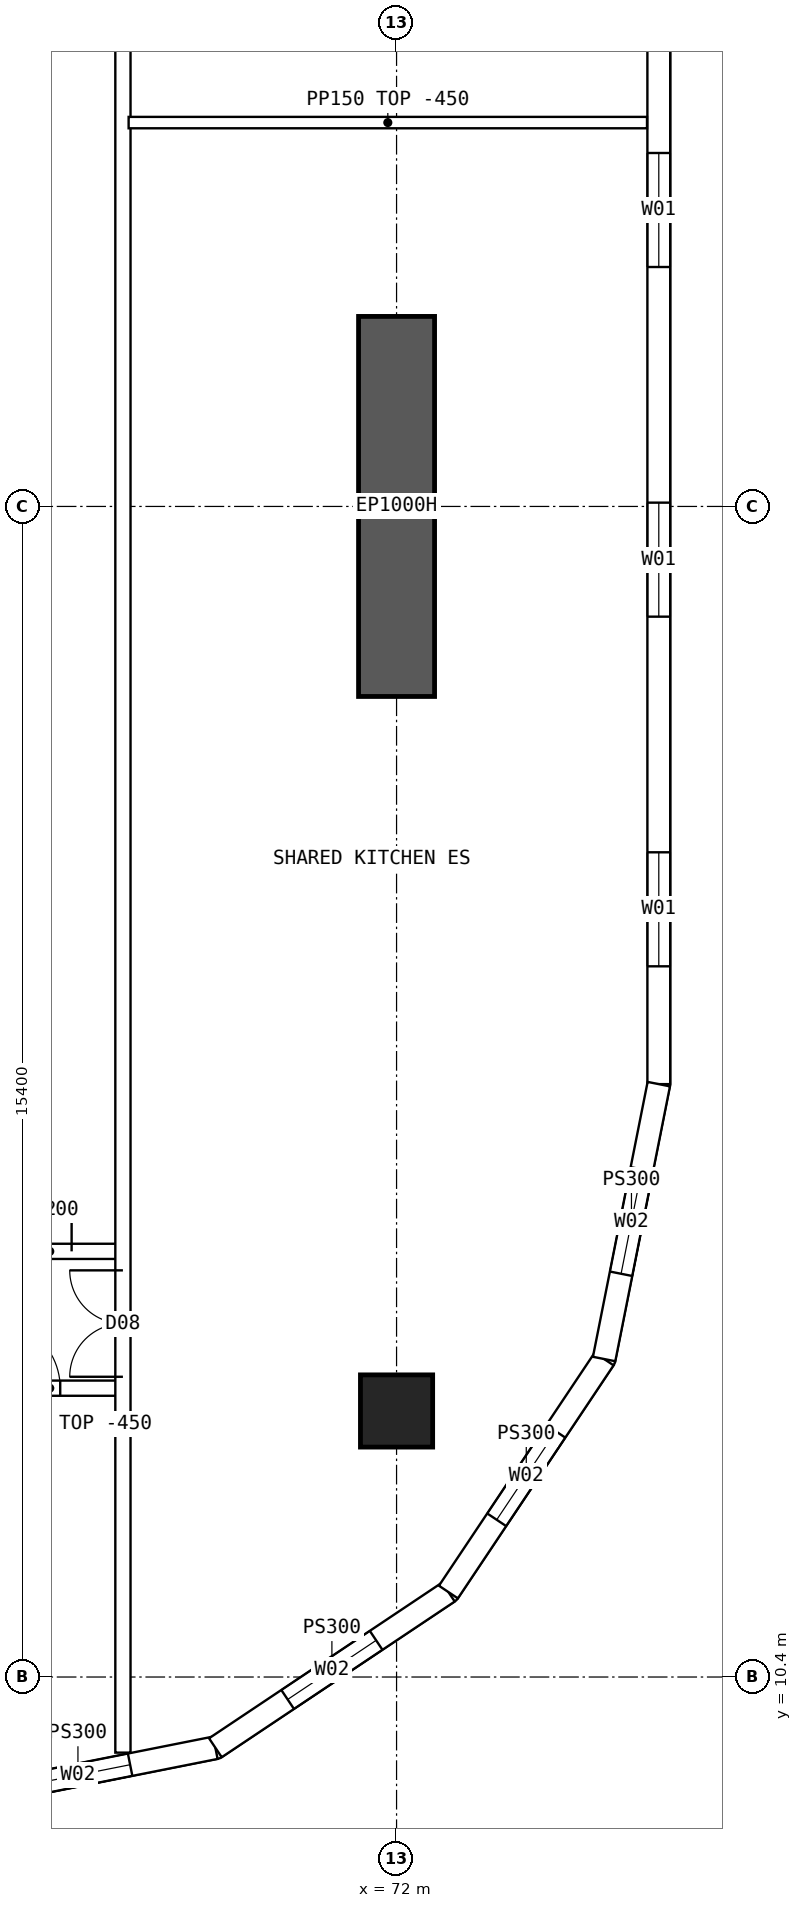
"""IFC4 building model, lengths in metres.
Left out: names, types, materials, properties, quantities, classifications, styles, units other than length and angle.
Written with IfcOpenShell. Run it as: python <this file> out.ifc"""

import sys

from ifc_helpers import new_model, si_unit, direction, frame, frame_2d, origin, origin_2d, place, context, subcontext, project, spatial, polyline, rectangle, hollow_rectangle, outline, extrude, element, fill, save


model = new_model("IFC4")
c1 = context("Model", 3, precision=1e-05, world=origin(), true_north=direction((0.0, 1.0)))
c2 = subcontext(c1, "Body", "Model", "MODEL_VIEW")
j1 = project(units=[si_unit("LENGTHUNIT", "METRE"), si_unit("PLANEANGLEUNIT", "RADIAN")], contexts=[c1])
p1 = place(None, origin())
s1 = spatial("IfcSite", under=j1, at=p1, CompositionType="ELEMENT")
p2 = place(p1, origin())
s2 = spatial("IfcBuilding", under=s1, at=p2, CompositionType="ELEMENT")
p3 = place(p2, frame((0.0, 0.0, 110.65)))
s3 = spatial("IfcBuildingStorey", under=s2, at=p3, CompositionType="ELEMENT", Elevation=110.65)
p4 = place(p3, frame((72.0, 13.9, 0.0), z_axis=(0.0, 0.0, 1.0), x_axis=(1.0, 0.0, 0.0)))
e1 = element("IfcColumn", 1, at=p4, inside=s3, PredefinedType="COLUMN", context=c2, shape_type="SweptSolid", body=[
    extrude(hollow_rectangle(XDim=0.95, YDim=0.95, WallThickness=0.095, at=origin_2d()), origin(), (0.0, 0.0, 1.0), 3.75),
])
p5 = place(p3, frame((72.0, 23.3, 0.0), z_axis=(0.0, 0.0, 1.0), x_axis=(0.0, 1.0, 0.0)))
e2 = element("IfcWall", 2, at=p5, inside=s3, PredefinedType="SHEAR", context=c2, shape_type="SweptSolid", body=[
    extrude(rectangle(XDim=5.0, YDim=1.0, at=frame_2d((2.5, 0.0))), origin(), (0.0, 0.0, 1.0), 3.75),
])
p6 = place(p3, frame((75.45, 18.2, 0.0), z_axis=(0.0, 0.0, 1.0), x_axis=(0.0, 1.0, 0.0)))
e3 = element("IfcWall", 3, at=p6, inside=s3, PredefinedType="SOLIDWALL", context=c2, shape_type="SweptSolid", body=[
    extrude(outline(polyline([(-0.015, -0.15), (27.615, -0.15), (27.585, 0.15), (0.015, 0.15), (-0.015, -0.15)])), origin(), (0.0, 0.0, 1.0), 3.3),
])
p7 = place(p6, frame((1.55, 0.0, 0.9)))
e4 = element("IfcOpeningElement", 4, at=p7, cuts=e3, PredefinedType="OPENING", context=c2, shape_type="SweptSolid", body=[
    extrude(rectangle(XDim=1.5, YDim=2.0, at=frame_2d((0.75, 1.0))), frame((0.0, 0.16, 0.0), z_axis=(0.0, -1.0, 0.0), x_axis=(1.0, 0.0, 0.0)), (0.0, 0.0, 1.0), 0.32),
])
p8 = place(p6, frame((6.15, 0.0, 0.9)))
e5 = element("IfcOpeningElement", 5, at=p8, cuts=e3, PredefinedType="OPENING", context=c2, shape_type="SweptSolid", body=[
    extrude(rectangle(XDim=1.5, YDim=2.0, at=frame_2d((0.75, 1.0))), frame((0.0, 0.16, 0.0), z_axis=(0.0, -1.0, 0.0), x_axis=(1.0, 0.0, 0.0)), (0.0, 0.0, 1.0), 0.32),
])
p9 = place(p6, frame((10.75, 0.0, 0.9)))
e6 = element("IfcOpeningElement", 6, at=p9, cuts=e3, PredefinedType="OPENING", context=c2, shape_type="SweptSolid", body=[
    extrude(rectangle(XDim=1.5, YDim=2.0, at=frame_2d((0.75, 1.0))), frame((0.0, 0.16, 0.0), z_axis=(0.0, -1.0, 0.0), x_axis=(1.0, 0.0, 0.0)), (0.0, 0.0, 1.0), 0.32),
])
p10 = place(p6, frame((15.35, 0.0, 0.9)))
e7 = element("IfcOpeningElement", 7, at=p10, cuts=e3, PredefinedType="OPENING", context=c2, shape_type="SweptSolid", body=[
    extrude(rectangle(XDim=1.5, YDim=2.0, at=frame_2d((0.75, 1.0))), frame((0.0, 0.16, 0.0), z_axis=(0.0, -1.0, 0.0), x_axis=(1.0, 0.0, 0.0)), (0.0, 0.0, 1.0), 0.32),
])
p11 = place(p6, frame((19.95, 0.0, 0.9)))
e8 = element("IfcOpeningElement", 8, at=p11, cuts=e3, PredefinedType="OPENING", context=c2, shape_type="SweptSolid", body=[
    extrude(rectangle(XDim=1.5, YDim=2.0, at=frame_2d((0.75, 1.0))), frame((0.0, 0.16, 0.0), z_axis=(0.0, -1.0, 0.0), x_axis=(1.0, 0.0, 0.0)), (0.0, 0.0, 1.0), 0.32),
])
p12 = place(p6, frame((24.55, 0.0, 0.9)))
e9 = element("IfcOpeningElement", 9, at=p12, cuts=e3, PredefinedType="OPENING", context=c2, shape_type="SweptSolid", body=[
    extrude(rectangle(XDim=1.5, YDim=2.0, at=frame_2d((0.75, 1.0))), frame((0.0, 0.16, 0.0), z_axis=(0.0, -1.0, 0.0), x_axis=(1.0, 0.0, 0.0)), (0.0, 0.0, 1.0), 0.32),
])
p13 = place(p3, frame((66.0, 8.75, 0.0), z_axis=(0.0, 0.0, 1.0), x_axis=(0.980791473772, 0.195059183267, 0.0)))
e10 = element("IfcWall", 10, at=p13, inside=s3, PredefinedType="SOLIDWALL", context=c2, shape_type="SweptSolid", body=[
    extrude(outline(polyline([(-0.03, -0.15), (3.717, -0.15), (3.657, 0.15), (0.03, 0.15), (-0.03, -0.15)])), origin(), (0.0, 0.0, 1.0), 3.3),
])
p14 = place(p13, frame((1.144, 0.0, 0.9)))
e11 = element("IfcOpeningElement", 11, at=p14, cuts=e10, PredefinedType="OPENING", context=c2, shape_type="SweptSolid", body=[
    extrude(rectangle(XDim=1.4, YDim=1.8, at=frame_2d((0.7, 0.9))), frame((0.0, 0.16, 0.0), z_axis=(0.0, -1.0, 0.0), x_axis=(1.0, 0.0, 0.0)), (0.0, 0.0, 1.0), 0.32),
])
p15 = place(p3, frame((69.616, 9.469, 0.0), z_axis=(0.0, 0.0, 1.0), x_axis=(0.831448786846, 0.555601399253, 0.0)))
e12 = element("IfcWall", 12, at=p15, inside=s3, PredefinedType="SOLIDWALL", context=c2, shape_type="SweptSolid", body=[
    extrude(outline(polyline([(-0.03, -0.15), (3.717, -0.15), (3.657, 0.15), (0.03, 0.15), (-0.03, -0.15)])), origin(), (0.0, 0.0, 1.0), 3.3),
])
p16 = place(p15, frame((1.144, 0.0, 0.9)))
e13 = element("IfcOpeningElement", 13, at=p16, cuts=e12, PredefinedType="OPENING", context=c2, shape_type="SweptSolid", body=[
    extrude(rectangle(XDim=1.4, YDim=1.8, at=frame_2d((0.7, 0.9))), frame((0.0, 0.16, 0.0), z_axis=(0.0, -1.0, 0.0), x_axis=(1.0, 0.0, 0.0)), (0.0, 0.0, 1.0), 0.32),
])
p17 = place(p3, frame((72.682, 11.518, 0.0), z_axis=(0.0, 0.0, 1.0), x_axis=(0.555601399253, 0.831448786846, 0.0)))
e14 = element("IfcWall", 14, at=p17, inside=s3, PredefinedType="SOLIDWALL", context=c2, shape_type="SweptSolid", body=[
    extrude(outline(polyline([(-0.03, -0.15), (3.717, -0.15), (3.657, 0.15), (0.03, 0.15), (-0.03, -0.15)])), origin(), (0.0, 0.0, 1.0), 3.3),
])
p18 = place(p17, frame((1.144, 0.0, 0.9)))
e15 = element("IfcOpeningElement", 15, at=p18, cuts=e14, PredefinedType="OPENING", context=c2, shape_type="SweptSolid", body=[
    extrude(rectangle(XDim=1.4, YDim=1.8, at=frame_2d((0.7, 0.9))), frame((0.0, 0.16, 0.0), z_axis=(0.0, -1.0, 0.0), x_axis=(1.0, 0.0, 0.0)), (0.0, 0.0, 1.0), 0.32),
])
p19 = place(p3, frame((74.731, 14.583, 0.0), z_axis=(0.0, 0.0, 1.0), x_axis=(0.195059183267, 0.980791473772, 0.0)))
e16 = element("IfcWall", 16, at=p19, inside=s3, PredefinedType="SOLIDWALL", context=c2, shape_type="SweptSolid", body=[
    extrude(outline(polyline([(-0.03, -0.15), (3.702, -0.15), (3.672, 0.15), (0.03, 0.15), (-0.03, -0.15)])), origin(), (0.0, 0.0, 1.0), 3.3),
])
p20 = place(p19, frame((1.144, 0.0, 0.9)))
e17 = element("IfcOpeningElement", 17, at=p20, cuts=e16, PredefinedType="OPENING", context=c2, shape_type="SweptSolid", body=[
    extrude(rectangle(XDim=1.4, YDim=1.8, at=frame_2d((0.7, 0.9))), frame((0.0, 0.16, 0.0), z_axis=(0.0, -1.0, 0.0), x_axis=(1.0, 0.0, 0.0)), (0.0, 0.0, 1.0), 0.32),
])
p21 = place(p3, frame((66.475, 14.2, 0.0), z_axis=(0.0, 0.0, 1.0), x_axis=(1.0, 0.0, 0.0)))
e18 = element("IfcWall", 18, at=p21, inside=s3, PredefinedType="SOLIDWALL", context=c2, shape_type="SweptSolid", body=[
    extrude(rectangle(XDim=1.925, YDim=0.2, at=frame_2d((0.962, 0.0))), origin(), (0.0, 0.0, 1.0), 3.3),
])
p22 = place(p21, frame((0.2, 0.0, 0.0)))
e19 = element("IfcOpeningElement", 19, at=p22, cuts=e18, PredefinedType="OPENING", context=c2, shape_type="SweptSolid", body=[
    extrude(rectangle(XDim=0.9, YDim=2.1, at=frame_2d((0.45, 1.05))), frame((0.0, 0.11, 0.0), z_axis=(0.0, -1.0, 0.0), x_axis=(1.0, 0.0, 0.0)), (0.0, 0.0, 1.0), 0.22),
])
p23 = place(p3, frame((66.475, 16.0, 0.0), z_axis=(0.0, 0.0, 1.0), x_axis=(1.0, 0.0, 0.0)))
e20 = element("IfcWall", 20, at=p23, inside=s3, PredefinedType="SOLIDWALL", context=c2, shape_type="SweptSolid", body=[
    extrude(rectangle(XDim=1.925, YDim=0.2, at=frame_2d((0.962, 0.0))), origin(), (0.0, 0.0, 1.0), 3.3),
])
p24 = place(p23, frame((0.05, 0.0, 0.0)))
e21 = element("IfcOpeningElement", 21, at=p24, cuts=e20, PredefinedType="OPENING", context=c2, shape_type="SweptSolid", body=[
    extrude(rectangle(XDim=1.2, YDim=2.1, at=frame_2d((0.6, 1.05))), frame((0.0, 0.11, 0.0), z_axis=(0.0, -1.0, 0.0), x_axis=(1.0, 0.0, 0.0)), (0.0, 0.0, 1.0), 0.22),
])
p25 = place(p3, frame((68.475, 30.85, 0.0), z_axis=(0.0, 0.0, 1.0), x_axis=(1.0, 0.0, 0.0)))
e22 = element("IfcWall", 22, at=p25, inside=s3, PredefinedType="PARTITIONING", context=c2, shape_type="SweptSolid", body=[
    extrude(outline(polyline([(0.0, 0.0), (6.82, 0.0), (6.82, 3.3), (3.827, 3.3), (3.825, 2.85), (3.227, 2.85), (3.225, 3.3), (0.0, 3.3), (0.0, 0.0)])), frame((0.0, 0.075, 0.0), z_axis=(0.0, -1.0, 0.0), x_axis=(1.0, 0.0, 0.0)), (0.0, 0.0, 1.0), 0.15),
])
p26 = place(p3, frame((68.4, 9.405, 0.0), z_axis=(0.0, 0.0, 1.0), x_axis=(0.0, 1.0, 0.0)))
e23 = element("IfcWall", 23, at=p26, inside=s3, PredefinedType="SOLIDWALL", context=c2, shape_type="SweptSolid", body=[
    extrude(rectangle(XDim=45.189, YDim=0.2, at=frame_2d((22.595, 0.0))), origin(), (0.0, 0.0, 1.0), 3.3),
])
p27 = place(p26, frame((25.595, 0.0, 0.0)))
e24 = element("IfcOpeningElement", 24, at=p27, cuts=e23, PredefinedType="OPENING", context=c2, shape_type="SweptSolid", body=[
    extrude(rectangle(XDim=1.2, YDim=2.1, at=frame_2d((0.6, 1.05))), frame((0.0, 0.11, 0.0), z_axis=(0.0, -1.0, 0.0), x_axis=(1.0, 0.0, 0.0)), (0.0, 0.0, 1.0), 0.22),
])
p28 = place(p26, frame((4.945, 0.0, 0.0)))
e25 = element("IfcOpeningElement", 25, at=p28, cuts=e23, PredefinedType="OPENING", context=c2, shape_type="SweptSolid", body=[
    extrude(rectangle(XDim=1.4, YDim=2.1, at=frame_2d((0.7, 1.05))), frame((0.0, 0.11, 0.0), z_axis=(0.0, -1.0, 0.0), x_axis=(1.0, 0.0, 0.0)), (0.0, 0.0, 1.0), 0.22),
])
p29 = place(p26, frame((38.745, 0.0, 0.0)))
e26 = element("IfcOpeningElement", 26, at=p29, cuts=e23, PredefinedType="OPENING", context=c2, shape_type="SweptSolid", body=[
    extrude(rectangle(XDim=1.4, YDim=2.1, at=frame_2d((0.7, 1.05))), frame((0.0, 0.11, 0.0), z_axis=(0.0, -1.0, 0.0), x_axis=(1.0, 0.0, 0.0)), (0.0, 0.0, 1.0), 0.22),
])
p30 = place(p7, origin())
e27 = element("IfcWindow", 27, at=p30, inside=s3, PartitioningType="SINGLE_PANEL", PredefinedType="WINDOW", context=c2, shape_type="SweptSolid", body=[
    extrude(rectangle(XDim=1.5, YDim=2.0, at=frame_2d((0.75, 1.0))), frame((0.0, 0.03, 0.0), z_axis=(0.0, -1.0, 0.0), x_axis=(1.0, 0.0, 0.0)), (0.0, 0.0, 1.0), 0.06),
])
fill(e4, e27)
p31 = place(p8, origin())
e28 = element("IfcWindow", 28, at=p31, inside=s3, PartitioningType="SINGLE_PANEL", PredefinedType="WINDOW", context=c2, shape_type="SweptSolid", body=[
    extrude(rectangle(XDim=1.5, YDim=2.0, at=frame_2d((0.75, 1.0))), frame((0.0, 0.03, 0.0), z_axis=(0.0, -1.0, 0.0), x_axis=(1.0, 0.0, 0.0)), (0.0, 0.0, 1.0), 0.06),
])
fill(e5, e28)
p32 = place(p9, origin())
e29 = element("IfcWindow", 29, at=p32, inside=s3, PartitioningType="SINGLE_PANEL", PredefinedType="WINDOW", context=c2, shape_type="SweptSolid", body=[
    extrude(rectangle(XDim=1.5, YDim=2.0, at=frame_2d((0.75, 1.0))), frame((0.0, 0.03, 0.0), z_axis=(0.0, -1.0, 0.0), x_axis=(1.0, 0.0, 0.0)), (0.0, 0.0, 1.0), 0.06),
])
fill(e6, e29)
p33 = place(p14, origin())
e30 = element("IfcWindow", 30, at=p33, inside=s3, PartitioningType="SINGLE_PANEL", PredefinedType="WINDOW", context=c2, shape_type="SweptSolid", body=[
    extrude(rectangle(XDim=1.4, YDim=1.8, at=frame_2d((0.7, 0.9))), frame((0.0, 0.03, 0.0), z_axis=(0.0, -1.0, 0.0), x_axis=(1.0, 0.0, 0.0)), (0.0, 0.0, 1.0), 0.06),
])
fill(e11, e30)
p34 = place(p16, origin())
e31 = element("IfcWindow", 31, at=p34, inside=s3, PartitioningType="SINGLE_PANEL", PredefinedType="WINDOW", context=c2, shape_type="SweptSolid", body=[
    extrude(rectangle(XDim=1.4, YDim=1.8, at=frame_2d((0.7, 0.9))), frame((0.0, 0.03, 0.0), z_axis=(0.0, -1.0, 0.0), x_axis=(1.0, 0.0, 0.0)), (0.0, 0.0, 1.0), 0.06),
])
fill(e13, e31)
p35 = place(p18, origin())
e32 = element("IfcWindow", 32, at=p35, inside=s3, PartitioningType="SINGLE_PANEL", PredefinedType="WINDOW", context=c2, shape_type="SweptSolid", body=[
    extrude(rectangle(XDim=1.4, YDim=1.8, at=frame_2d((0.7, 0.9))), frame((0.0, 0.03, 0.0), z_axis=(0.0, -1.0, 0.0), x_axis=(1.0, 0.0, 0.0)), (0.0, 0.0, 1.0), 0.06),
])
fill(e15, e32)
p36 = place(p20, origin())
e33 = element("IfcWindow", 33, at=p36, inside=s3, PartitioningType="SINGLE_PANEL", PredefinedType="WINDOW", context=c2, shape_type="SweptSolid", body=[
    extrude(rectangle(XDim=1.4, YDim=1.8, at=frame_2d((0.7, 0.9))), frame((0.0, 0.03, 0.0), z_axis=(0.0, -1.0, 0.0), x_axis=(1.0, 0.0, 0.0)), (0.0, 0.0, 1.0), 0.06),
])
fill(e17, e33)
p37 = place(p24, origin())
e34 = element("IfcDoor", 34, at=p37, inside=s3, OperationType="DOUBLE_DOOR_SINGLE_SWING", PredefinedType="DOOR", context=c2, shape_type="SweptSolid", body=[
    extrude(rectangle(XDim=1.2, YDim=2.1, at=frame_2d((0.6, 1.05))), frame((0.0, 0.025, 0.0), z_axis=(0.0, -1.0, 0.0), x_axis=(1.0, 0.0, 0.0)), (0.0, 0.0, 1.0), 0.05),
])
fill(e21, e34)
p38 = place(p28, origin())
e35 = element("IfcDoor", 35, at=p38, inside=s3, OperationType="DOUBLE_DOOR_SINGLE_SWING", PredefinedType="DOOR", context=c2, shape_type="SweptSolid", body=[
    extrude(rectangle(XDim=1.4, YDim=2.1, at=frame_2d((0.7, 1.05))), frame((0.0, 0.025, 0.0), z_axis=(0.0, -1.0, 0.0), x_axis=(1.0, 0.0, 0.0)), (0.0, 0.0, 1.0), 0.05),
])
fill(e25, e35)
p39 = place(p22, origin())
e36 = element("IfcDoor", 36, at=p39, inside=s3, OperationType="SINGLE_SWING_LEFT", PredefinedType="DOOR", context=c2, shape_type="SweptSolid", body=[
    extrude(rectangle(XDim=0.9, YDim=2.1, at=frame_2d((0.45, 1.05))), frame((0.0, 0.025, 0.0), z_axis=(0.0, -1.0, 0.0), x_axis=(1.0, 0.0, 0.0)), (0.0, 0.0, 1.0), 0.05),
])
fill(e19, e36)
save(model, sys.argv[1])
